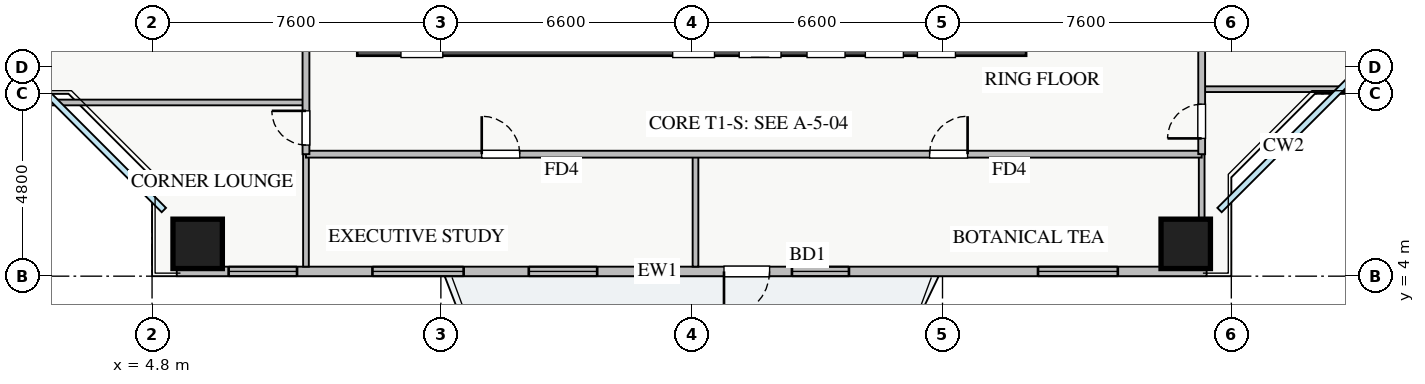
"""IFC4 building model, lengths in metres.
Left out: names, types, materials, properties, quantities, classifications, styles, units other than length and angle.
Written with IfcOpenShell. Run it as: python <this file> out.ifc"""

import sys

from ifc_helpers import new_model, si_unit, direction, frame, frame_2d, origin, origin_2d, place, context, subcontext, project, spatial, rectangle, extrude, source, transform, mapped, element, fill, save


model = new_model("IFC4")
c1 = context("Model", 3, precision=1e-05, world=origin(), true_north=direction((0.0, 1.0)))
c2 = subcontext(c1, "Body", "Model", "MODEL_VIEW")
j1 = project(units=[si_unit("LENGTHUNIT", "METRE"), si_unit("PLANEANGLEUNIT", "RADIAN")], contexts=[c1])
p1 = place(None, origin())
s1 = spatial("IfcSite", under=j1, at=p1, CompositionType="ELEMENT")
p2 = place(p1, origin())
s2 = spatial("IfcBuilding", under=s1, at=p2, CompositionType="ELEMENT")
p3 = place(p2, frame((0.0, 0.0, 32.75)))
s3 = spatial("IfcBuildingStorey", under=s2, at=p3, CompositionType="ELEMENT", Elevation=32.75)
p4 = place(p3, frame((10.2, 10.2, 0.0), z_axis=(0.0, 0.0, 1.0), x_axis=(1.0, 0.0, 0.0)))
e1 = element("IfcWall", 1, at=p4, inside=s3, PredefinedType="SHEAR", context=c2, shape_type="SweptSolid", body=[
    extrude(rectangle(XDim=17.6, YDim=0.8, at=frame_2d((8.8, 0.0))), origin(), (0.0, 0.0, 1.0), 3.25),
])
p5 = place(p4, frame((1.15, 0.0, 0.0)))
e2 = element("IfcOpeningElement", 2, at=p5, cuts=e1, PredefinedType="OPENING", context=c2, shape_type="SweptSolid", body=[
    extrude(rectangle(XDim=1.1, YDim=2.05, at=frame_2d((0.55, 1.025))), frame((0.0, 0.41, 0.0), z_axis=(0.0, -1.0, 0.0), x_axis=(1.0, 0.0, 0.0)), (0.0, 0.0, 1.0), 0.82),
])
p6 = place(p4, frame((8.3, 0.0, 0.0)))
e3 = element("IfcOpeningElement", 3, at=p6, cuts=e1, PredefinedType="OPENING", context=c2, shape_type="SweptSolid", body=[
    extrude(rectangle(XDim=1.1, YDim=2.05, at=frame_2d((0.55, 1.025))), frame((0.0, 0.41, 0.0), z_axis=(0.0, -1.0, 0.0), x_axis=(1.0, 0.0, 0.0)), (0.0, 0.0, 1.0), 0.82),
])
p7 = place(p4, frame((10.05, 0.0, 0.0)))
e4 = element("IfcOpeningElement", 4, at=p7, cuts=e1, PredefinedType="OPENING", context=c2, shape_type="SweptSolid", body=[
    extrude(rectangle(XDim=1.1, YDim=2.05, at=frame_2d((0.55, 1.025))), frame((0.0, 0.41, 0.0), z_axis=(0.0, -1.0, 0.0), x_axis=(1.0, 0.0, 0.0)), (0.0, 0.0, 1.0), 0.82),
])
p8 = place(p4, frame((14.74, 0.0, 0.0)))
e5 = element("IfcOpeningElement", 5, at=p8, cuts=e1, PredefinedType="OPENING", context=c2, shape_type="SweptSolid", body=[
    extrude(rectangle(XDim=1.0, YDim=2.05, at=frame_2d((0.5, 1.025))), frame((0.0, 0.41, 0.0), z_axis=(0.0, -1.0, 0.0), x_axis=(1.0, 0.0, 0.0)), (0.0, 0.0, 1.0), 0.82),
])
p9 = place(p4, frame((11.835, 0.0, 0.0)))
e6 = element("IfcOpeningElement", 6, at=p9, cuts=e1, PredefinedType="OPENING", context=c2, shape_type="SweptSolid", body=[
    extrude(rectangle(XDim=1.0, YDim=2.05, at=frame_2d((0.5, 1.025))), frame((0.0, 0.41, 0.0), z_axis=(0.0, -1.0, 0.0), x_axis=(1.0, 0.0, 0.0)), (0.0, 0.0, 1.0), 0.82),
])
p10 = place(p4, frame((13.37, 0.0, 0.0)))
e7 = element("IfcOpeningElement", 7, at=p10, cuts=e1, PredefinedType="OPENING", context=c2, shape_type="SweptSolid", body=[
    extrude(rectangle(XDim=1.0, YDim=2.05, at=frame_2d((0.5, 1.025))), frame((0.0, 0.41, 0.0), z_axis=(0.0, -1.0, 0.0), x_axis=(1.0, 0.0, 0.0)), (0.0, 0.0, 1.0), 0.82),
])
m1 = source(origin(), c2, "Body", "SweptSolid", [
    extrude(rectangle(XDim=1.3, YDim=1.3, at=origin_2d()), origin(), (0.0, 0.0, 1.0), 3.25),
])
for number, where, z_axis, x_axis in (
    (8, (6.0, 4.85, 0.0), (0.0, 0.0, 1.0), (1.0, 0.0, 0.0)),
    (9, (32.0, 4.85, 0.0), (0.0, 0.0, 1.0), (1.0, 0.0, 0.0)),
):
    element("IfcColumn", number, at=place(p3, frame(where, z_axis=z_axis, x_axis=x_axis)), inside=s3, PredefinedType="COLUMN", context=c2, shape_type="MappedRepresentation", body=[
        mapped(m1, transform((0.0, 0.0, 0.0), x_axis=(1.0, 0.0, 0.0), y_axis=(0.0, 1.0, 0.0), z_axis=(0.0, 0.0, 1.0), scale=1.0)),
    ])
p11 = place(p3, frame((5.45, 4.125, 0.0), z_axis=(0.0, 0.0, 1.0), x_axis=(1.0, 0.0, 0.0)))
e10 = element("IfcWall", 10, at=p11, inside=s3, PredefinedType="STANDARD", context=c2, shape_type="SweptSolid", body=[
    extrude(rectangle(XDim=27.1, YDim=0.25, at=frame_2d((13.55, 0.0))), origin(), (0.0, 0.0, 1.0), 2.61),
])
p12 = place(p11, frame((14.4, 0.0, 0.0)))
e11 = element("IfcOpeningElement", 11, at=p12, cuts=e10, PredefinedType="OPENING", context=c2, shape_type="SweptSolid", body=[
    extrude(rectangle(XDim=1.2, YDim=2.1, at=frame_2d((0.6, 1.05))), frame((0.0, 0.135, 0.0), z_axis=(0.0, -1.0, 0.0), x_axis=(1.0, 0.0, 0.0)), (0.0, 0.0, 1.0), 0.27),
])
p13 = place(p11, frame((1.365, 0.0, 0.9)))
e12 = element("IfcOpeningElement", 12, at=p13, cuts=e10, PredefinedType="OPENING", context=c2, shape_type="SweptSolid", body=[
    extrude(rectangle(XDim=1.8, YDim=1.5, at=frame_2d((0.9, 0.75))), frame((0.0, 0.135, 0.0), z_axis=(0.0, -1.0, 0.0), x_axis=(1.0, 0.0, 0.0)), (0.0, 0.0, 1.0), 0.27),
])
p14 = place(p11, frame((9.263, 0.0, 0.9)))
e13 = element("IfcOpeningElement", 13, at=p14, cuts=e10, PredefinedType="OPENING", context=c2, shape_type="SweptSolid", body=[
    extrude(rectangle(XDim=1.8, YDim=1.45, at=frame_2d((0.9, 0.725))), frame((0.0, 0.135, 0.0), z_axis=(0.0, -1.0, 0.0), x_axis=(1.0, 0.0, 0.0)), (0.0, 0.0, 1.0), 0.27),
])
p15 = place(p11, frame((16.188, 0.0, 0.9)))
e14 = element("IfcOpeningElement", 14, at=p15, cuts=e10, PredefinedType="OPENING", context=c2, shape_type="SweptSolid", body=[
    extrude(rectangle(XDim=1.5, YDim=1.45, at=frame_2d((0.75, 0.725))), frame((0.0, 0.135, 0.0), z_axis=(0.0, -1.0, 0.0), x_axis=(1.0, 0.0, 0.0)), (0.0, 0.0, 1.0), 0.27),
])
p16 = place(p11, frame((22.663, 0.0, 0.9)))
e15 = element("IfcOpeningElement", 15, at=p16, cuts=e10, PredefinedType="OPENING", context=c2, shape_type="SweptSolid", body=[
    extrude(rectangle(XDim=2.1, YDim=1.48, at=frame_2d((1.05, 0.74))), frame((0.0, 0.135, 0.0), z_axis=(0.0, -1.0, 0.0), x_axis=(1.0, 0.0, 0.0)), (0.0, 0.0, 1.0), 0.27),
])
p17 = place(p11, frame((5.149, 0.0, 0.9)))
e16 = element("IfcOpeningElement", 16, at=p17, cuts=e10, PredefinedType="OPENING", context=c2, shape_type="SweptSolid", body=[
    extrude(rectangle(XDim=2.4, YDim=1.5, at=frame_2d((1.2, 0.75))), frame((0.0, 0.135, 0.0), z_axis=(0.0, -1.0, 0.0), x_axis=(1.0, 0.0, 0.0)), (0.0, 0.0, 1.0), 0.27),
])
p18 = place(p3, frame((19.1, 4.25, 0.0), z_axis=(0.0, 0.0, 1.0), x_axis=(0.0, 1.0, 0.0)))
e17 = element("IfcWall", 17, at=p18, inside=s3, PredefinedType="PARTITIONING", context=c2, shape_type="SweptSolid", body=[
    extrude(rectangle(XDim=2.96, YDim=0.15, at=frame_2d((1.48, 0.0))), origin(), (0.0, 0.0, 1.0), 2.771),
])
for number, where, z_axis, x_axis in (
    (18, (8.85, 4.25, 0.0), (0.0, 0.0, 1.0), (0.0, 1.0, 0.0)),
    (19, (32.42, 4.25, 0.0), (0.0, 0.0, 1.0), (0.0, 1.0, 0.0)),
):
    element("IfcWall", number, at=place(p3, frame(where, z_axis=z_axis, x_axis=x_axis)), inside=s3, PredefinedType="PARTITIONING", context=c2, shape_type="SweptSolid", body=[
        extrude(rectangle(XDim=2.96, YDim=0.15, at=frame_2d((1.48, 0.0))), origin(), (0.0, 0.0, 1.0), 3.07),
    ])
p19 = place(p3, frame((8.85, 7.21, 0.0), z_axis=(0.0, 0.0, 1.0), x_axis=(1.0, 0.0, 0.0)))
e20 = element("IfcWall", 20, at=p19, inside=s3, PredefinedType="PARTITIONING", context=c2, shape_type="SweptSolid", body=[
    extrude(rectangle(XDim=23.57, YDim=0.18, at=frame_2d((11.785, 0.0))), origin(), (0.0, 0.0, 1.0), 3.07),
])
p20 = place(p19, frame((4.625, 0.0, 0.0)))
e21 = element("IfcOpeningElement", 21, at=p20, cuts=e20, PredefinedType="OPENING", context=c2, shape_type="SweptSolid", body=[
    extrude(rectangle(XDim=1.0, YDim=2.05, at=frame_2d((0.5, 1.025))), frame((0.0, 0.1, 0.0), z_axis=(0.0, -1.0, 0.0), x_axis=(1.0, 0.0, 0.0)), (0.0, 0.0, 1.0), 0.2),
])
p21 = place(p19, frame((16.41, 0.0, 0.0)))
e22 = element("IfcOpeningElement", 22, at=p21, cuts=e20, PredefinedType="OPENING", context=c2, shape_type="SweptSolid", body=[
    extrude(rectangle(XDim=1.0, YDim=2.05, at=frame_2d((0.5, 1.025))), frame((0.0, 0.1, 0.0), z_axis=(0.0, -1.0, 0.0), x_axis=(1.0, 0.0, 0.0)), (0.0, 0.0, 1.0), 0.2),
])
p22 = place(p3, frame((0.25, 8.57, 0.0), z_axis=(0.0, 0.0, 1.0), x_axis=(1.0, 0.0, 0.0)))
e23 = element("IfcWall", 23, at=p22, inside=s3, PredefinedType="PARTITIONING", context=c2, shape_type="SweptSolid", body=[
    extrude(rectangle(XDim=8.6, YDim=0.15, at=frame_2d((4.3, 0.0))), origin(), (0.0, 0.0, 1.0), 3.07),
])
p23 = place(p3, frame((8.85, 7.21, 0.0), z_axis=(0.0, 0.0, 1.0), x_axis=(0.0, 1.0, 0.0)))
e24 = element("IfcWall", 24, at=p23, inside=s3, PredefinedType="PARTITIONING", context=c2, shape_type="SweptSolid", body=[
    extrude(rectangle(XDim=31.23, YDim=0.18, at=frame_2d((15.615, 0.0))), origin(), (0.0, 0.0, 1.0), 3.07),
])
p24 = place(p23, frame((30.09, 0.0, 0.0)))
e25 = element("IfcOpeningElement", 25, at=p24, cuts=e24, PredefinedType="OPENING", context=c2, shape_type="SweptSolid", body=[
    extrude(rectangle(XDim=0.9, YDim=2.05, at=frame_2d((0.45, 1.025))), frame((0.0, 0.1, 0.0), z_axis=(0.0, -1.0, 0.0), x_axis=(1.0, 0.0, 0.0)), (0.0, 0.0, 1.0), 0.2),
])
p25 = place(p23, frame((0.24, 0.0, 0.0)))
e26 = element("IfcOpeningElement", 26, at=p25, cuts=e24, PredefinedType="OPENING", context=c2, shape_type="SweptSolid", body=[
    extrude(rectangle(XDim=0.9, YDim=2.05, at=frame_2d((0.45, 1.025))), frame((0.0, 0.1, 0.0), z_axis=(0.0, -1.0, 0.0), x_axis=(1.0, 0.0, 0.0)), (0.0, 0.0, 1.0), 0.2),
])
p26 = place(p23, frame((3.06, 0.0, 0.0)))
e27 = element("IfcOpeningElement", 27, at=p26, cuts=e24, PredefinedType="OPENING", context=c2, shape_type="SweptSolid", body=[
    extrude(rectangle(XDim=1.0, YDim=2.05, at=frame_2d((0.5, 1.025))), frame((0.0, 0.1, 0.0), z_axis=(0.0, -1.0, 0.0), x_axis=(1.0, 0.0, 0.0)), (0.0, 0.0, 1.0), 0.2),
])
p27 = place(p23, frame((12.795, 0.0, 0.0)))
e28 = element("IfcOpeningElement", 28, at=p27, cuts=e24, PredefinedType="OPENING", context=c2, shape_type="SweptSolid", body=[
    extrude(rectangle(XDim=1.0, YDim=2.05, at=frame_2d((0.5, 1.025))), frame((0.0, 0.1, 0.0), z_axis=(0.0, -1.0, 0.0), x_axis=(1.0, 0.0, 0.0)), (0.0, 0.0, 1.0), 0.2),
])
p28 = place(p23, frame((24.62, 0.0, 0.0)))
e29 = element("IfcOpeningElement", 29, at=p28, cuts=e24, PredefinedType="OPENING", context=c2, shape_type="SweptSolid", body=[
    extrude(rectangle(XDim=1.0, YDim=2.05, at=frame_2d((0.5, 1.025))), frame((0.0, 0.1, 0.0), z_axis=(0.0, -1.0, 0.0), x_axis=(1.0, 0.0, 0.0)), (0.0, 0.0, 1.0), 0.2),
])
p29 = place(p3, frame((32.42, 8.92, 0.0), z_axis=(0.0, 0.0, 1.0), x_axis=(1.0, 0.0, 0.0)))
e30 = element("IfcWall", 30, at=p29, inside=s3, PredefinedType="PARTITIONING", context=c2, shape_type="SweptSolid", body=[
    extrude(rectangle(XDim=5.33, YDim=0.15, at=frame_2d((2.665, 0.0))), origin(), (0.0, 0.0, 1.0), 3.07),
])
p30 = place(p3, frame((32.42, 7.21, 0.0), z_axis=(0.0, 0.0, 1.0), x_axis=(0.0, 1.0, 0.0)))
e31 = element("IfcWall", 31, at=p30, inside=s3, PredefinedType="PARTITIONING", context=c2, shape_type="SweptSolid", body=[
    extrude(rectangle(XDim=31.23, YDim=0.18, at=frame_2d((15.615, 0.0))), origin(), (0.0, 0.0, 1.0), 2.771),
])
p31 = place(p30, frame((30.09, 0.0, 0.0)))
e32 = element("IfcOpeningElement", 32, at=p31, cuts=e31, PredefinedType="OPENING", context=c2, shape_type="SweptSolid", body=[
    extrude(rectangle(XDim=0.9, YDim=2.05, at=frame_2d((0.45, 1.025))), frame((0.0, 0.1, 0.0), z_axis=(0.0, -1.0, 0.0), x_axis=(1.0, 0.0, 0.0)), (0.0, 0.0, 1.0), 0.2),
])
p32 = place(p30, frame((0.415, 0.0, 0.0)))
e33 = element("IfcOpeningElement", 33, at=p32, cuts=e31, PredefinedType="OPENING", context=c2, shape_type="SweptSolid", body=[
    extrude(rectangle(XDim=0.9, YDim=2.05, at=frame_2d((0.45, 1.025))), frame((0.0, 0.1, 0.0), z_axis=(0.0, -1.0, 0.0), x_axis=(1.0, 0.0, 0.0)), (0.0, 0.0, 1.0), 0.2),
])
p33 = place(p30, frame((3.465, 0.0, 0.0)))
e34 = element("IfcOpeningElement", 34, at=p33, cuts=e31, PredefinedType="OPENING", context=c2, shape_type="SweptSolid", body=[
    extrude(rectangle(XDim=1.0, YDim=2.05, at=frame_2d((0.5, 1.025))), frame((0.0, 0.1, 0.0), z_axis=(0.0, -1.0, 0.0), x_axis=(1.0, 0.0, 0.0)), (0.0, 0.0, 1.0), 0.2),
])
p34 = place(p30, frame((12.635, 0.0, 0.0)))
e35 = element("IfcOpeningElement", 35, at=p34, cuts=e31, PredefinedType="OPENING", context=c2, shape_type="SweptSolid", body=[
    extrude(rectangle(XDim=1.0, YDim=2.05, at=frame_2d((0.5, 1.025))), frame((0.0, 0.1, 0.0), z_axis=(0.0, -1.0, 0.0), x_axis=(1.0, 0.0, 0.0)), (0.0, 0.0, 1.0), 0.2),
])
p35 = place(p30, frame((22.5, 0.0, 0.0)))
e36 = element("IfcOpeningElement", 36, at=p35, cuts=e31, PredefinedType="OPENING", context=c2, shape_type="SweptSolid", body=[
    extrude(rectangle(XDim=1.0, YDim=2.05, at=frame_2d((0.5, 1.025))), frame((0.0, 0.1, 0.0), z_axis=(0.0, -1.0, 0.0), x_axis=(1.0, 0.0, 0.0)), (0.0, 0.0, 1.0), 0.2),
])
m2 = source(origin(), c2, "Body", "SweptSolid", [
    extrude(rectangle(XDim=1.2, YDim=2.1, at=frame_2d((0.6, 1.05))), frame((0.0, 0.025, 0.0), z_axis=(0.0, -1.0, 0.0), x_axis=(1.0, 0.0, 0.0)), (0.0, 0.0, 1.0), 0.05),
])
p36 = place(p12, frame((1.2, 0.0, 0.0), z_axis=(0.0, 0.0, 1.0), x_axis=(-1.0, 0.0, 0.0)))
e37 = element("IfcDoor", 37, at=p36, inside=s3, OperationType="SINGLE_SWING_LEFT", PredefinedType="DOOR", context=c2, shape_type="MappedRepresentation", body=[
    mapped(m2, transform((0.0, 0.0, 0.0), x_axis=(1.0, 0.0, 0.0), y_axis=(0.0, 1.0, 0.0), z_axis=(0.0, 0.0, 1.0), scale=1.0)),
])
fill(e11, e37)
m3 = source(origin(), c2, "Body", "SweptSolid", [
    extrude(rectangle(XDim=1.8, YDim=1.5, at=frame_2d((0.9, 0.75))), frame((0.0, 0.03, 0.0), z_axis=(0.0, -1.0, 0.0), x_axis=(1.0, 0.0, 0.0)), (0.0, 0.0, 1.0), 0.06),
])
p37 = place(p13, origin())
e38 = element("IfcWindow", 38, at=p37, inside=s3, PartitioningType="TRIPLE_PANEL_VERTICAL", PredefinedType="WINDOW", context=c2, shape_type="MappedRepresentation", body=[
    mapped(m3, transform((0.0, 0.0, 0.0), x_axis=(1.0, 0.0, 0.0), y_axis=(0.0, 1.0, 0.0), z_axis=(0.0, 0.0, 1.0), scale=1.0)),
])
fill(e12, e38)
m4 = source(origin(), c2, "Body", "SweptSolid", [
    extrude(rectangle(XDim=1.8, YDim=1.45, at=frame_2d((0.9, 0.725))), frame((0.0, 0.03, 0.0), z_axis=(0.0, -1.0, 0.0), x_axis=(1.0, 0.0, 0.0)), (0.0, 0.0, 1.0), 0.06),
])
p38 = place(p14, origin())
e39 = element("IfcWindow", 39, at=p38, inside=s3, PartitioningType="DOUBLE_PANEL_VERTICAL", PredefinedType="WINDOW", context=c2, shape_type="MappedRepresentation", body=[
    mapped(m4, transform((0.0, 0.0, 0.0), x_axis=(1.0, 0.0, 0.0), y_axis=(0.0, 1.0, 0.0), z_axis=(0.0, 0.0, 1.0), scale=1.0)),
])
fill(e13, e39)
m5 = source(origin(), c2, "Body", "SweptSolid", [
    extrude(rectangle(XDim=1.5, YDim=1.45, at=frame_2d((0.75, 0.725))), frame((0.0, 0.03, 0.0), z_axis=(0.0, -1.0, 0.0), x_axis=(1.0, 0.0, 0.0)), (0.0, 0.0, 1.0), 0.06),
])
p39 = place(p15, origin())
e40 = element("IfcWindow", 40, at=p39, inside=s3, PartitioningType="DOUBLE_PANEL_VERTICAL", PredefinedType="WINDOW", context=c2, shape_type="MappedRepresentation", body=[
    mapped(m5, transform((0.0, 0.0, 0.0), x_axis=(1.0, 0.0, 0.0), y_axis=(0.0, 1.0, 0.0), z_axis=(0.0, 0.0, 1.0), scale=1.0)),
])
fill(e14, e40)
m6 = source(origin(), c2, "Body", "SweptSolid", [
    extrude(rectangle(XDim=2.1, YDim=1.48, at=frame_2d((1.05, 0.74))), frame((0.0, 0.03, 0.0), z_axis=(0.0, -1.0, 0.0), x_axis=(1.0, 0.0, 0.0)), (0.0, 0.0, 1.0), 0.06),
])
p40 = place(p16, origin())
e41 = element("IfcWindow", 41, at=p40, inside=s3, PartitioningType="TRIPLE_PANEL_VERTICAL", PredefinedType="WINDOW", context=c2, shape_type="MappedRepresentation", body=[
    mapped(m6, transform((0.0, 0.0, 0.0), x_axis=(1.0, 0.0, 0.0), y_axis=(0.0, 1.0, 0.0), z_axis=(0.0, 0.0, 1.0), scale=1.0)),
])
fill(e15, e41)
m7 = source(origin(), c2, "Body", "SweptSolid", [
    extrude(rectangle(XDim=1.0, YDim=2.05, at=frame_2d((0.5, 1.025))), frame((0.0, 0.025, 0.0), z_axis=(0.0, -1.0, 0.0), x_axis=(1.0, 0.0, 0.0)), (0.0, 0.0, 1.0), 0.05),
])
p41 = place(p20, origin())
e42 = element("IfcDoor", 42, at=p41, inside=s3, OperationType="SINGLE_SWING_LEFT", PredefinedType="DOOR", context=c2, shape_type="MappedRepresentation", body=[
    mapped(m7, transform((0.0, 0.0, 0.0), x_axis=(1.0, 0.0, 0.0), y_axis=(0.0, 1.0, 0.0), z_axis=(0.0, 0.0, 1.0), scale=1.0)),
])
fill(e21, e42)
p42 = place(p21, origin())
e43 = element("IfcDoor", 43, at=p42, inside=s3, OperationType="SINGLE_SWING_RIGHT", PredefinedType="DOOR", context=c2, shape_type="MappedRepresentation", body=[
    mapped(m7, transform((0.0, 0.0, 0.0), x_axis=(1.0, 0.0, 0.0), y_axis=(0.0, 1.0, 0.0), z_axis=(0.0, 0.0, 1.0), scale=1.0)),
])
fill(e22, e43)
m8 = source(origin(), c2, "Body", "SweptSolid", [
    extrude(rectangle(XDim=0.9, YDim=2.05, at=frame_2d((0.45, 1.025))), frame((0.0, 0.025, 0.0), z_axis=(0.0, -1.0, 0.0), x_axis=(1.0, 0.0, 0.0)), (0.0, 0.0, 1.0), 0.05),
])
p43 = place(p25, origin())
e44 = element("IfcDoor", 44, at=p43, inside=s3, OperationType="SINGLE_SWING_RIGHT", PredefinedType="DOOR", context=c2, shape_type="MappedRepresentation", body=[
    mapped(m8, transform((0.0, 0.0, 0.0), x_axis=(1.0, 0.0, 0.0), y_axis=(0.0, 1.0, 0.0), z_axis=(0.0, 0.0, 1.0), scale=1.0)),
])
fill(e26, e44)
p44 = place(p32, origin())
e45 = element("IfcDoor", 45, at=p44, inside=s3, OperationType="SINGLE_SWING_LEFT", PredefinedType="DOOR", context=c2, shape_type="MappedRepresentation", body=[
    mapped(m8, transform((0.0, 0.0, 0.0), x_axis=(1.0, 0.0, 0.0), y_axis=(0.0, 1.0, 0.0), z_axis=(0.0, 0.0, 1.0), scale=1.0)),
])
fill(e33, e45)
m9 = source(origin(), c2, "Body", "SweptSolid", [
    extrude(rectangle(XDim=2.4, YDim=1.5, at=frame_2d((1.2, 0.75))), frame((0.0, 0.03, 0.0), z_axis=(0.0, -1.0, 0.0), x_axis=(1.0, 0.0, 0.0)), (0.0, 0.0, 1.0), 0.06),
])
p45 = place(p17, origin())
e46 = element("IfcWindow", 46, at=p45, inside=s3, PartitioningType="TRIPLE_PANEL_VERTICAL", PredefinedType="WINDOW", context=c2, shape_type="MappedRepresentation", body=[
    mapped(m9, transform((0.0, 0.0, 0.0), x_axis=(1.0, 0.0, 0.0), y_axis=(0.0, 1.0, 0.0), z_axis=(0.0, 0.0, 1.0), scale=1.0)),
])
fill(e16, e46)
save(model, sys.argv[1])
